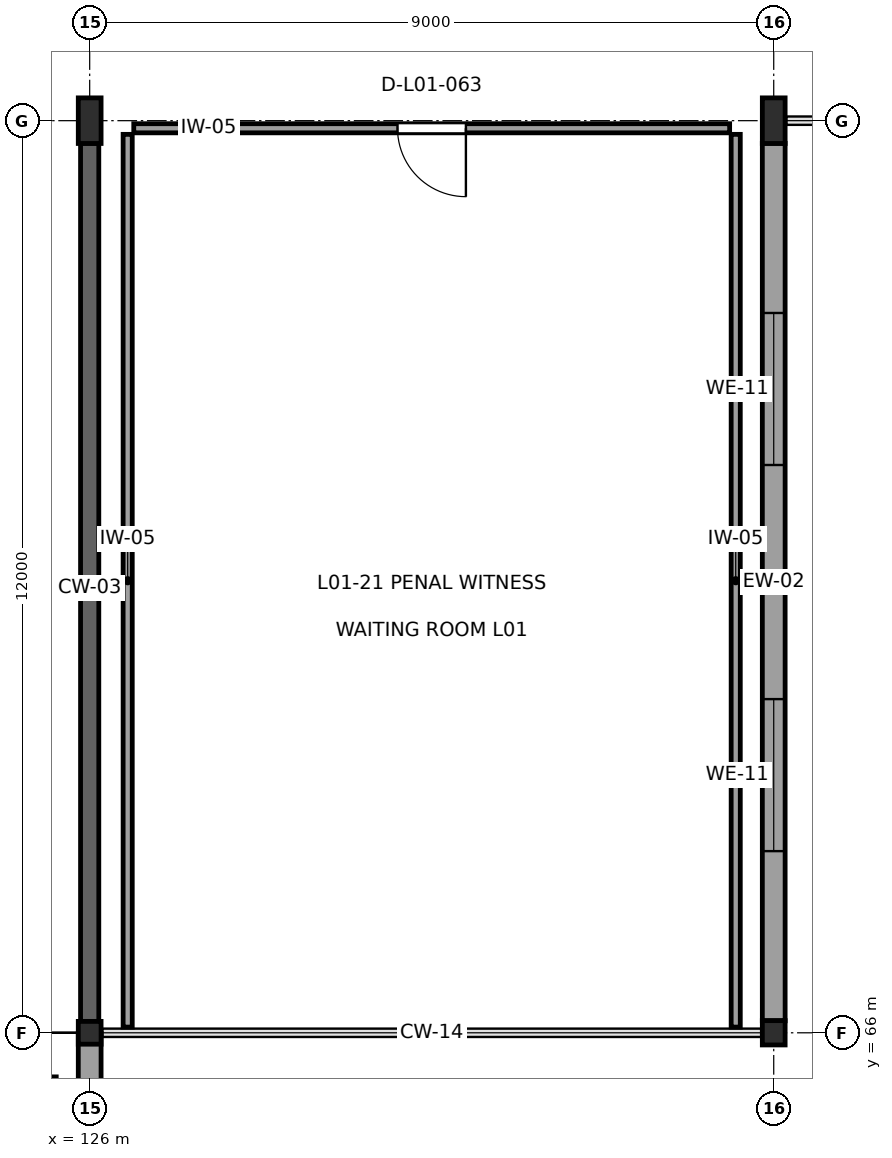
"""IFC4 building model, lengths in metres.
Left out: names, types, materials, properties, quantities, classifications, styles, units other than length and angle.
Written with IfcOpenShell. Run it as: python <this file> out.ifc"""

import sys

from ifc_helpers import new_model, si_unit, direction, frame, frame_2d, origin, origin_2d, place, context, subcontext, project, spatial, rectangle, i_section, extrude, element, fill, save


model = new_model("IFC4")
c1 = context("Model", 3, precision=1e-05, world=origin(), true_north=direction((0.0, 1.0)))
c2 = subcontext(c1, "Body", "Model", "MODEL_VIEW")
j1 = project(units=[si_unit("LENGTHUNIT", "METRE"), si_unit("PLANEANGLEUNIT", "RADIAN")], contexts=[c1])
p1 = place(None, origin())
s1 = spatial("IfcSite", under=j1, at=p1, CompositionType="ELEMENT")
p2 = place(p1, origin())
s2 = spatial("IfcBuilding", under=s1, at=p2, CompositionType="ELEMENT")
p3 = place(p2, frame((0.0, 0.0, 5.4)))
s3 = spatial("IfcBuildingStorey", under=s2, at=p3, CompositionType="ELEMENT", Elevation=5.4)
p4 = place(p3, frame((126.0, 66.0, 0.0), z_axis=(0.0, 0.0, 1.0), x_axis=(0.0, 1.0, 0.0)))
e1 = element("IfcColumn", 1, at=p4, inside=s3, PredefinedType="COLUMN", context=c2, shape_type="SweptSolid", body=[
    extrude(i_section(OverallWidth=0.3, OverallDepth=0.3, WebThickness=0.011, FlangeThickness=0.019, at=origin_2d()), origin(), (0.0, 0.0, 1.0), 4.5),
])
p5 = place(p3, frame((126.0, 78.0, 0.0), z_axis=(0.0, 0.0, 1.0), x_axis=(1.0, 0.0, 0.0)))
e2 = element("IfcColumn", 2, at=p5, inside=s3, PredefinedType="COLUMN", context=c2, shape_type="SweptSolid", body=[
    extrude(i_section(OverallWidth=0.3, OverallDepth=0.6, WebThickness=0.015, FlangeThickness=0.03, at=origin_2d()), origin(), (0.0, 0.0, 1.0), 4.5),
])
p6 = place(p3, frame((135.0, 66.0, 0.0), z_axis=(0.0, 0.0, 1.0), x_axis=(1.0, 0.0, 0.0)))
e3 = element("IfcColumn", 3, at=p6, inside=s3, PredefinedType="COLUMN", context=c2, shape_type="SweptSolid", body=[
    extrude(i_section(OverallWidth=0.3, OverallDepth=0.32, WebThickness=0.011, FlangeThickness=0.021, at=origin_2d()), origin(), (0.0, 0.0, 1.0), 4.5),
])
p7 = place(p3, frame((135.0, 78.0, 0.0), z_axis=(0.0, 0.0, 1.0), x_axis=(1.0, 0.0, 0.0)))
e4 = element("IfcColumn", 4, at=p7, inside=s3, PredefinedType="COLUMN", context=c2, shape_type="SweptSolid", body=[
    extrude(i_section(OverallWidth=0.3, OverallDepth=0.6, WebThickness=0.015, FlangeThickness=0.03, at=origin_2d()), origin(), (0.0, 0.0, 1.0), 4.5),
])
p8 = place(p3, frame((135.0, 66.158, 0.0), z_axis=(0.0, 0.0, 1.0), x_axis=(0.0, 1.0, 0.0)))
e5 = element("IfcWall", 5, at=p8, inside=s3, PredefinedType="SOLIDWALL", context=c2, shape_type="SweptSolid", body=[
    extrude(rectangle(XDim=11.544, YDim=0.3, at=frame_2d((5.772, 0.0))), origin(), (0.0, 0.0, 1.0), 3.595),
])
p9 = place(p8, frame((2.232, 0.0, 0.8)))
e6 = element("IfcOpeningElement", 6, at=p9, cuts=e5, PredefinedType="OPENING", context=c2, shape_type="SweptSolid", body=[
    extrude(rectangle(XDim=2.0, YDim=2.0, at=frame_2d((1.0, 1.0))), frame((0.0, 0.165, 0.0), z_axis=(0.0, -1.0, 0.0), x_axis=(1.0, 0.0, 0.0)), (0.0, 0.0, 1.0), 0.33),
])
p10 = place(p8, frame((7.312, 0.0, 0.8)))
e7 = element("IfcOpeningElement", 7, at=p10, cuts=e5, PredefinedType="OPENING", context=c2, shape_type="SweptSolid", body=[
    extrude(rectangle(XDim=2.0, YDim=2.0, at=frame_2d((1.0, 1.0))), frame((0.0, 0.165, 0.0), z_axis=(0.0, -1.0, 0.0), x_axis=(1.0, 0.0, 0.0)), (0.0, 0.0, 1.0), 0.33),
])
p11 = place(p3, frame((126.0, 54.148, 0.0), z_axis=(0.0, 0.0, 1.0), x_axis=(0.0, 1.0, 0.0)))
e8 = element("IfcWall", 8, at=p11, inside=s3, PredefinedType="SOLIDWALL", context=c2, shape_type="SweptSolid", body=[
    extrude(rectangle(XDim=11.844, YDim=0.3, at=frame_2d((5.922, 0.0))), origin(), (0.0, 0.0, 1.0), 3.665),
])
p12 = place(p3, frame((126.0, 66.008, 0.0), z_axis=(0.0, 0.0, 1.0), x_axis=(0.0, 1.0, 0.0)))
e9 = element("IfcWall", 9, at=p12, inside=s3, PredefinedType="SHEAR", context=c2, shape_type="SweptSolid", body=[
    extrude(rectangle(XDim=11.694, YDim=0.24, at=frame_2d((5.847, 0.0))), origin(), (0.0, 0.0, 1.0), 3.645),
])
for number, where, z_axis, x_axis in (
    (10, (134.5, 77.82, 0.0), (0.0, 0.0, 1.0), (0.0, -1.0, 0.0)),
    (11, (126.5, 66.075, 0.0), (0.0, 0.0, 1.0), (0.0, 1.0, 0.0)),
):
    element("IfcWall", number, at=place(p3, frame(where, z_axis=z_axis, x_axis=x_axis)), inside=s3, PredefinedType="PARTITIONING", context=c2, shape_type="SweptSolid", body=[
        extrude(rectangle(XDim=11.745, YDim=0.12, at=frame_2d((5.873, 0.0))), origin(), (0.0, 0.0, 1.0), 4.14),
    ])
p13 = place(p3, frame((126.58, 77.9, 0.0), z_axis=(0.0, 0.0, 1.0), x_axis=(1.0, 0.0, 0.0)))
e12 = element("IfcWall", 12, at=p13, inside=s3, PredefinedType="PARTITIONING", context=c2, shape_type="SweptSolid", body=[
    extrude(rectangle(XDim=7.84, YDim=0.12, at=frame_2d((3.92, 0.0))), origin(), (0.0, 0.0, 1.0), 3.755),
])
p14 = place(p13, frame((3.47, 0.0, 0.0)))
e13 = element("IfcOpeningElement", 13, at=p14, cuts=e12, PredefinedType="OPENING", context=c2, shape_type="SweptSolid", body=[
    extrude(rectangle(XDim=0.9, YDim=2.1, at=frame_2d((0.45, 1.05))), frame((0.0, 0.075, 0.0), z_axis=(0.0, -1.0, 0.0), x_axis=(1.0, 0.0, 0.0)), (0.0, 0.0, 1.0), 0.15),
])
p15 = place(p3, frame((125.5, 65.42, 0.0), z_axis=(0.0, 0.0, 1.0), x_axis=(0.0, -1.0, 0.0)))
e14 = element("IfcWall", 14, at=p15, inside=s3, PredefinedType="PARTITIONING", context=c2, shape_type="SweptSolid", body=[
    extrude(rectangle(XDim=10.84, YDim=0.12, at=frame_2d((5.42, 0.0))), origin(), (0.0, 0.0, 1.0), 4.14),
])
p16 = place(p9, origin())
e15 = element("IfcWindow", 15, at=p16, inside=s3, PartitioningType="SINGLE_PANEL", PredefinedType="WINDOW", context=c2, shape_type="SweptSolid", body=[
    extrude(rectangle(XDim=2.0, YDim=2.0, at=frame_2d((1.0, 1.0))), frame((0.0, 0.03, 0.0), z_axis=(0.0, -1.0, 0.0), x_axis=(1.0, 0.0, 0.0)), (0.0, 0.0, 1.0), 0.06),
])
fill(e6, e15)
p17 = place(p10, origin())
e16 = element("IfcWindow", 16, at=p17, inside=s3, PartitioningType="SINGLE_PANEL", PredefinedType="WINDOW", context=c2, shape_type="SweptSolid", body=[
    extrude(rectangle(XDim=2.0, YDim=2.0, at=frame_2d((1.0, 1.0))), frame((0.0, 0.03, 0.0), z_axis=(0.0, -1.0, 0.0), x_axis=(1.0, 0.0, 0.0)), (0.0, 0.0, 1.0), 0.06),
])
fill(e7, e16)
p18 = place(p14, frame((0.9, 0.0, 0.0), z_axis=(0.0, 0.0, 1.0), x_axis=(-1.0, 0.0, 0.0)))
e17 = element("IfcDoor", 17, at=p18, inside=s3, OperationType="SINGLE_SWING_RIGHT", PredefinedType="DOOR", context=c2, shape_type="SweptSolid", body=[
    extrude(rectangle(XDim=0.9, YDim=2.1, at=frame_2d((0.45, 1.05))), frame((0.0, 0.025, 0.0), z_axis=(0.0, -1.0, 0.0), x_axis=(1.0, 0.0, 0.0)), (0.0, 0.0, 1.0), 0.05),
])
fill(e13, e17)
save(model, sys.argv[1])
